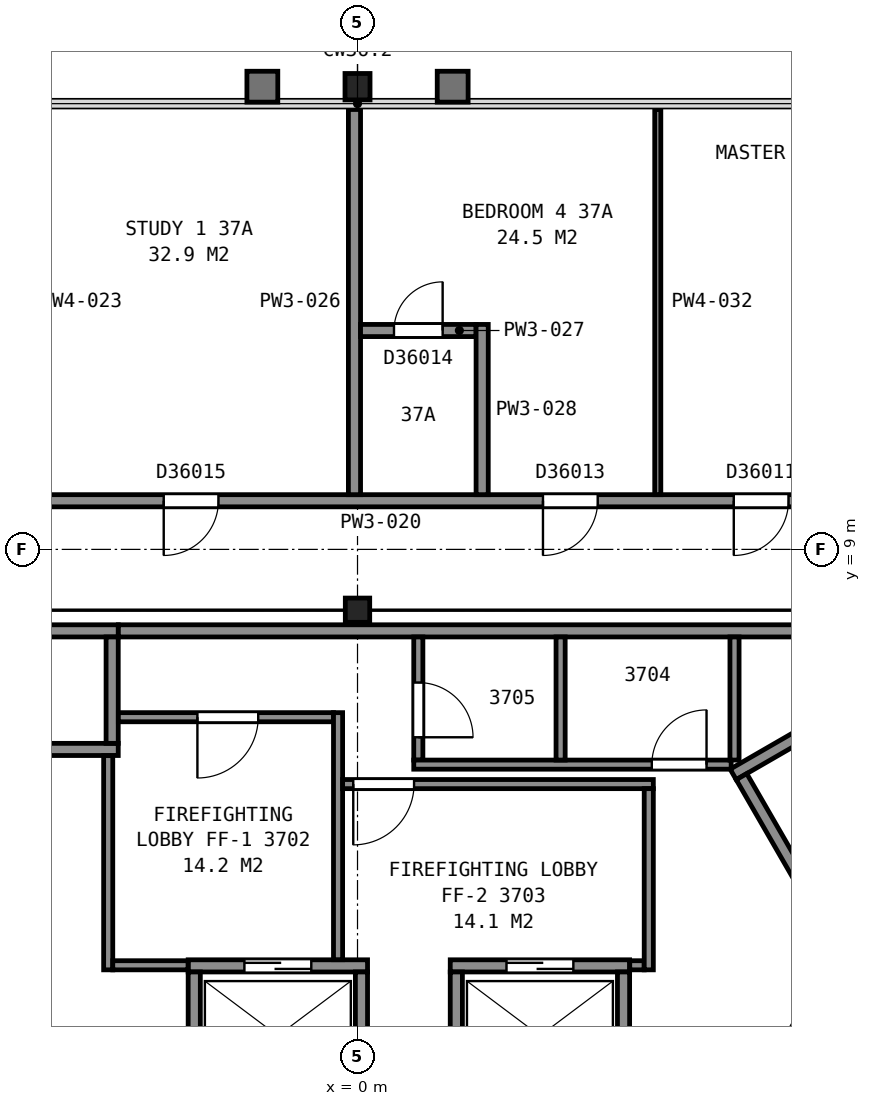
"""IFC4 building model, lengths in metres.
Left out: names, types, materials, properties, quantities, classifications, styles, units other than length and angle.
Written with IfcOpenShell. Run it as: python <this file> out.ifc"""

import sys

from ifc_helpers import new_model, si_unit, direction, frame, frame_2d, origin, origin_2d, place, context, subcontext, project, spatial, rectangle, i_section, extrude, element, fill, save


model = new_model("IFC4")
c1 = context("Model", 3, precision=1e-05, world=origin(), true_north=direction((0.0, 1.0)))
c2 = subcontext(c1, "Body", "Model", "MODEL_VIEW")
j1 = project(units=[si_unit("LENGTHUNIT", "METRE"), si_unit("PLANEANGLEUNIT", "RADIAN")], contexts=[c1])
p1 = place(None, origin())
s1 = spatial("IfcSite", under=j1, at=p1, CompositionType="ELEMENT")
p2 = place(p1, origin())
s2 = spatial("IfcBuilding", under=s1, at=p2, CompositionType="ELEMENT")
p3 = place(p2, frame((0.0, 0.0, 152.5)))
s3 = spatial("IfcBuildingStorey", under=s2, at=p3, CompositionType="ELEMENT", Elevation=152.5)
p4 = place(p3, frame((0.0, 16.61, 0.0), z_axis=(0.0, 0.0, 1.0), x_axis=(1.0, 0.0, 0.0)))
e1 = element("IfcColumn", 1, at=p4, inside=s3, PredefinedType="COLUMN", context=c2, shape_type="SweptSolid", body=[
    extrude(i_section(OverallWidth=0.411, OverallDepth=0.434, WebThickness=0.036, FlangeThickness=0.057, FilletRadius=0.015, at=origin_2d()), origin(), (0.0, 0.0, 1.0), 3.665),
])
p5 = place(p3, frame((0.0, 8.0, 0.0), z_axis=(0.0, 0.0, 1.0), x_axis=(1.0, 0.0, 0.0)))
e2 = element("IfcColumn", 2, at=p5, inside=s3, PredefinedType="COLUMN", context=c2, shape_type="SweptSolid", body=[
    extrude(i_section(OverallWidth=0.401, OverallDepth=0.399, WebThickness=0.025, FlangeThickness=0.04, FilletRadius=0.015, at=origin_2d()), origin(), (0.0, 0.0, 1.0), 3.7),
])
p6 = place(p3, frame((6.178, 5.299, 0.0), z_axis=(0.0, 0.0, 1.0), x_axis=(0.866019993635, 0.500009370536, 0.0)))
e3 = element("IfcWall", 3, at=p6, inside=s3, PredefinedType="PARTITIONING", context=c2, shape_type="SweptSolid", body=[
    extrude(rectangle(XDim=9.6, YDim=0.2, at=frame_2d((4.8, 0.0))), origin(), (0.0, 0.0, 1.0), 3.45),
])
p7 = place(p3, frame((7.715, 2.838, 0.0), z_axis=(0.0, 0.0, 1.0), x_axis=(-0.500049511043, 0.865996816683, 0.0)))
e4 = element("IfcWall", 4, at=p7, inside=s3, PredefinedType="PARTITIONING", context=c2, shape_type="SweptSolid", body=[
    extrude(rectangle(XDim=2.8, YDim=0.2, at=frame_2d((1.4, 0.0))), origin(), (0.0, 0.0, 1.0), 3.45),
])
p8 = place(p3, frame((-2.785, 2.15, 0.0), z_axis=(0.0, 0.0, 1.0), x_axis=(1.0, 0.0, 0.0)))
e5 = element("IfcWall", 5, at=p8, inside=s3, PredefinedType="PARTITIONING", context=c2, shape_type="SweptSolid", body=[
    extrude(rectangle(XDim=2.95, YDim=0.2, at=frame_2d((1.475, 0.0))), origin(), (0.0, 0.0, 1.0), 3.7),
])
p9 = place(p8, frame((0.925, 0.0, 0.0)))
e6 = element("IfcOpeningElement", 6, at=p9, cuts=e5, PredefinedType="OPENING", context=c2, shape_type="SweptSolid", body=[
    extrude(rectangle(XDim=1.1, YDim=2.1, at=frame_2d((0.55, 1.05))), frame((0.0, 0.11, 0.0), z_axis=(0.0, -1.0, 0.0), x_axis=(1.0, 0.0, 0.0)), (0.0, 0.0, 1.0), 0.22),
])
p10 = place(p3, frame((1.525, 2.15, 0.0), z_axis=(0.0, 0.0, 1.0), x_axis=(1.0, 0.0, 0.0)))
e7 = element("IfcWall", 7, at=p10, inside=s3, PredefinedType="PARTITIONING", context=c2, shape_type="SweptSolid", body=[
    extrude(rectangle(XDim=2.95, YDim=0.2, at=frame_2d((1.475, 0.0))), origin(), (0.0, 0.0, 1.0), 3.7),
])
p11 = place(p10, frame((0.925, 0.0, 0.0)))
e8 = element("IfcOpeningElement", 8, at=p11, cuts=e7, PredefinedType="OPENING", context=c2, shape_type="SweptSolid", body=[
    extrude(rectangle(XDim=1.1, YDim=2.1, at=frame_2d((0.55, 1.05))), frame((0.0, 0.11, 0.0), z_axis=(0.0, -1.0, 0.0), x_axis=(1.0, 0.0, 0.0)), (0.0, 0.0, 1.0), 0.22),
])
for number, where, z_axis, x_axis in (
    (9, (-6.285, 5.71, 0.0), (0.0, 0.0, 1.0), (1.0, 0.0, 0.0)),
    (10, (-6.285, 7.66, 0.0), (0.0, 0.0, 1.0), (1.0, 0.0, 0.0)),
):
    element("IfcWall", number, at=place(p3, frame(where, z_axis=z_axis, x_axis=x_axis)), inside=s3, PredefinedType="PARTITIONING", context=c2, shape_type="SweptSolid", body=[
        extrude(rectangle(XDim=2.35, YDim=0.2, at=frame_2d((1.175, 0.0))), origin(), (0.0, 0.0, 1.0), 3.7),
    ])
p12 = place(p3, frame((5.663, -1.612, 0.0), z_axis=(0.0, 0.0, 1.0), x_axis=(0.49998122708, 0.866036242063, 0.0)))
e11 = element("IfcWall", 11, at=p12, inside=s3, PredefinedType="PARTITIONING", context=c2, shape_type="SweptSolid", body=[
    extrude(rectangle(XDim=4.9, YDim=0.2, at=frame_2d((2.45, 0.0))), origin(), (0.0, 0.0, 1.0), 3.7),
])
for number, where, z_axis, x_axis in (
    (12, (4.375, 0.1, 0.0), (0.0, 0.0, 1.0), (0.0, 1.0, 0.0)),
    (13, (1.625, 0.1, 0.0), (0.0, 0.0, 1.0), (0.0, 1.0, 0.0)),
    (14, (0.065, 0.1, 0.0), (0.0, 0.0, 1.0), (0.0, 1.0, 0.0)),
    (15, (-2.685, 0.1, 0.0), (0.0, 0.0, 1.0), (0.0, 1.0, 0.0)),
):
    element("IfcWall", number, at=place(p3, frame(where, z_axis=z_axis, x_axis=x_axis)), inside=s3, PredefinedType="PARTITIONING", context=c2, shape_type="SweptSolid", body=[
        extrude(rectangle(XDim=1.95, YDim=0.2, at=frame_2d((0.975, 0.0))), origin(), (0.0, 0.0, 1.0), 3.7),
    ])
p13 = place(p3, frame((-4.035, 5.81, 0.0), z_axis=(0.0, 0.0, 1.0), x_axis=(0.0, 1.0, 0.0)))
e16 = element("IfcWall", 16, at=p13, inside=s3, PredefinedType="PARTITIONING", context=c2, shape_type="SweptSolid", body=[
    extrude(rectangle(XDim=1.75, YDim=0.2, at=frame_2d((0.875, 0.0))), origin(), (0.0, 0.0, 1.0), 3.7),
])
p14 = place(p3, frame((-4.1, 2.085, 0.0), z_axis=(0.0, 0.0, 1.0), x_axis=(0.0, 1.0, 0.0)))
e17 = element("IfcWall", 17, at=p14, inside=s3, PredefinedType="PARTITIONING", context=c2, shape_type="SweptSolid", body=[
    extrude(rectangle(XDim=3.523, YDim=0.15, at=frame_2d((1.761, 0.0))), origin(), (0.0, 0.0, 1.0), 3.45),
])
p15 = place(p3, frame((-4.025, 2.16, 0.0), z_axis=(0.0, 0.0, 1.0), x_axis=(1.0, 0.0, 0.0)))
e18 = element("IfcWall", 18, at=p15, inside=s3, PredefinedType="PARTITIONING", context=c2, shape_type="SweptSolid", body=[
    extrude(rectangle(XDim=1.238, YDim=0.15, at=frame_2d((0.619, 0.0))), origin(), (0.0, 0.0, 1.0), 3.45),
])
p16 = place(p3, frame((-3.933, 6.24, 0.0), z_axis=(0.0, 0.0, 1.0), x_axis=(1.0, 0.0, 0.0)))
e19 = element("IfcWall", 19, at=p16, inside=s3, PredefinedType="PARTITIONING", context=c2, shape_type="SweptSolid", body=[
    extrude(rectangle(XDim=3.538, YDim=0.15, at=frame_2d((1.769, 0.0))), origin(), (0.0, 0.0, 1.0), 3.45),
])
p17 = place(p16, frame((1.3, 0.0, 0.0)))
e20 = element("IfcOpeningElement", 20, at=p17, cuts=e19, PredefinedType="OPENING", context=c2, shape_type="SweptSolid", body=[
    extrude(rectangle(XDim=1.0, YDim=2.1, at=frame_2d((0.5, 1.05))), frame((0.0, 0.085, 0.0), z_axis=(0.0, -1.0, 0.0), x_axis=(1.0, 0.0, 0.0)), (0.0, 0.0, 1.0), 0.17),
])
p18 = place(p3, frame((-3.933, 7.66, 0.0), z_axis=(0.0, 0.0, 1.0), x_axis=(1.0, 0.0, 0.0)))
e21 = element("IfcWall", 21, at=p18, inside=s3, PredefinedType="PARTITIONING", context=c2, shape_type="SweptSolid", body=[
    extrude(rectangle(XDim=13.841, YDim=0.2, at=frame_2d((6.92, 0.0))), origin(), (0.0, 0.0, 1.0), 3.45),
])
p19 = place(p3, frame((-0.32, 2.252, 0.0), z_axis=(0.0, 0.0, 1.0), x_axis=(0.0, 1.0, 0.0)))
e22 = element("IfcWall", 22, at=p19, inside=s3, PredefinedType="PARTITIONING", context=c2, shape_type="SweptSolid", body=[
    extrude(rectangle(XDim=4.063, YDim=0.15, at=frame_2d((2.031, 0.0))), origin(), (0.0, 0.0, 1.0), 3.45),
])
p20 = place(p3, frame((-0.245, 5.14, 0.0), z_axis=(0.0, 0.0, 1.0), x_axis=(1.0, 0.0, 0.0)))
e23 = element("IfcWall", 23, at=p20, inside=s3, PredefinedType="PARTITIONING", context=c2, shape_type="SweptSolid", body=[
    extrude(rectangle(XDim=5.11, YDim=0.15, at=frame_2d((2.555, 0.0))), origin(), (0.0, 0.0, 1.0), 3.45),
])
p21 = place(p20, frame((0.175, 0.0, 0.0)))
e24 = element("IfcOpeningElement", 24, at=p21, cuts=e23, PredefinedType="OPENING", context=c2, shape_type="SweptSolid", body=[
    extrude(rectangle(XDim=1.0, YDim=2.1, at=frame_2d((0.5, 1.05))), frame((0.0, 0.085, 0.0), z_axis=(0.0, -1.0, 0.0), x_axis=(1.0, 0.0, 0.0)), (0.0, 0.0, 1.0), 0.17),
])
p22 = place(p3, frame((1.0, 7.56, 0.0), z_axis=(0.0, 0.0, 1.0), x_axis=(0.0, -1.0, 0.0)))
e25 = element("IfcWall", 25, at=p22, inside=s3, PredefinedType="PARTITIONING", context=c2, shape_type="SweptSolid", body=[
    extrude(rectangle(XDim=2.025, YDim=0.15, at=frame_2d((1.013, 0.0))), origin(), (0.0, 0.0, 1.0), 3.45),
])
p23 = place(p22, frame((0.75, 0.0, 0.0)))
e26 = element("IfcOpeningElement", 26, at=p23, cuts=e25, PredefinedType="OPENING", context=c2, shape_type="SweptSolid", body=[
    extrude(rectangle(XDim=0.9, YDim=2.1, at=frame_2d((0.45, 1.05))), frame((0.0, 0.085, 0.0), z_axis=(0.0, -1.0, 0.0), x_axis=(1.0, 0.0, 0.0)), (0.0, 0.0, 1.0), 0.17),
])
p24 = place(p3, frame((0.925, 5.46, 0.0), z_axis=(0.0, 0.0, 1.0), x_axis=(1.0, 0.0, 0.0)))
e27 = element("IfcWall", 27, at=p24, inside=s3, PredefinedType="PARTITIONING", context=c2, shape_type="SweptSolid", body=[
    extrude(rectangle(XDim=5.22, YDim=0.15, at=frame_2d((2.61, 0.0))), origin(), (0.0, 0.0, 1.0), 3.45),
])
p25 = place(p24, frame((3.915, 0.0, 0.0)))
e28 = element("IfcOpeningElement", 28, at=p25, cuts=e27, PredefinedType="OPENING", context=c2, shape_type="SweptSolid", body=[
    extrude(rectangle(XDim=0.9, YDim=2.1, at=frame_2d((0.45, 1.05))), frame((0.0, 0.085, 0.0), z_axis=(0.0, -1.0, 0.0), x_axis=(1.0, 0.0, 0.0)), (0.0, 0.0, 1.0), 0.17),
])
p26 = place(p3, frame((3.34, 5.535, 0.0), z_axis=(0.0, 0.0, 1.0), x_axis=(0.0, 1.0, 0.0)))
e29 = element("IfcWall", 29, at=p26, inside=s3, PredefinedType="PARTITIONING", context=c2, shape_type="SweptSolid", body=[
    extrude(rectangle(XDim=2.025, YDim=0.15, at=frame_2d((1.013, 0.0))), origin(), (0.0, 0.0, 1.0), 3.45),
])
p27 = place(p3, frame((4.477, 2.16, 0.0), z_axis=(0.0, 0.0, 1.0), x_axis=(1.0, 0.0, 0.0)))
e30 = element("IfcWall", 30, at=p27, inside=s3, PredefinedType="PARTITIONING", context=c2, shape_type="SweptSolid", body=[
    extrude(rectangle(XDim=0.238, YDim=0.15, at=frame_2d((0.119, 0.0))), origin(), (0.0, 0.0, 1.0), 3.45),
])
p28 = place(p3, frame((4.79, 2.085, 0.0), z_axis=(0.0, 0.0, 1.0), x_axis=(0.0, 1.0, 0.0)))
e31 = element("IfcWall", 31, at=p28, inside=s3, PredefinedType="PARTITIONING", context=c2, shape_type="SweptSolid", body=[
    extrude(rectangle(XDim=2.98, YDim=0.15, at=frame_2d((1.49, 0.0))), origin(), (0.0, 0.0, 1.0), 3.45),
])
p29 = place(p3, frame((6.2, 5.535, 0.0), z_axis=(0.0, 0.0, 1.0), x_axis=(0.0, 1.0, 0.0)))
e32 = element("IfcWall", 32, at=p29, inside=s3, PredefinedType="PARTITIONING", context=c2, shape_type="SweptSolid", body=[
    extrude(rectangle(XDim=2.025, YDim=0.15, at=frame_2d((1.013, 0.0))), origin(), (0.0, 0.0, 1.0), 3.45),
])
p30 = place(p3, frame((-4.075, -12.545, 0.0), z_axis=(0.0, 0.0, 1.0), x_axis=(-0.499999743747, 0.866025551732, 0.0)))
e33 = element("IfcWall", 33, at=p30, inside=s3, PredefinedType="PARTITIONING", context=c2, shape_type="SweptSolid", body=[
    extrude(rectangle(XDim=17.656, YDim=0.2, at=frame_2d((8.828, 0.0))), origin(), (0.0, 0.0, 1.0), 2.713),
])
p31 = place(p30, frame((10.08, 0.0, 0.0)))
e34 = element("IfcOpeningElement", 34, at=p31, cuts=e33, PredefinedType="OPENING", context=c2, shape_type="SweptSolid", body=[
    extrude(rectangle(XDim=0.9, YDim=2.1, at=frame_2d((0.45, 1.05))), frame((0.0, 0.11, 0.0), z_axis=(0.0, -1.0, 0.0), x_axis=(1.0, 0.0, 0.0)), (0.0, 0.0, 1.0), 0.22),
])
p32 = place(p30, frame((6.068, 0.0, 0.0)))
e35 = element("IfcOpeningElement", 35, at=p32, cuts=e33, PredefinedType="OPENING", context=c2, shape_type="SweptSolid", body=[
    extrude(rectangle(XDim=0.9, YDim=2.1, at=frame_2d((0.45, 1.05))), frame((0.0, 0.11, 0.0), z_axis=(0.0, -1.0, 0.0), x_axis=(1.0, 0.0, 0.0)), (0.0, 0.0, 1.0), 0.22),
])
p33 = place(p3, frame((-8.878, 9.8, 0.0), z_axis=(0.0, 0.0, 1.0), x_axis=(1.0, 0.0, 0.0)))
e36 = element("IfcWall", 36, at=p33, inside=s3, PredefinedType="PARTITIONING", context=c2, shape_type="SweptSolid", body=[
    extrude(rectangle(XDim=17.756, YDim=0.2, at=frame_2d((8.878, 0.0))), origin(), (0.0, 0.0, 1.0), 2.713),
])
p34 = place(p33, frame((15.066, 0.0, 0.0)))
e37 = element("IfcOpeningElement", 37, at=p34, cuts=e36, PredefinedType="OPENING", context=c2, shape_type="SweptSolid", body=[
    extrude(rectangle(XDim=0.9, YDim=2.1, at=frame_2d((0.45, 1.05))), frame((0.0, 0.11, 0.0), z_axis=(0.0, -1.0, 0.0), x_axis=(1.0, 0.0, 0.0)), (0.0, 0.0, 1.0), 0.22),
])
p35 = place(p33, frame((11.928, 0.0, 0.0)))
e38 = element("IfcOpeningElement", 38, at=p35, cuts=e36, PredefinedType="OPENING", context=c2, shape_type="SweptSolid", body=[
    extrude(rectangle(XDim=0.9, YDim=2.1, at=frame_2d((0.45, 1.05))), frame((0.0, 0.11, 0.0), z_axis=(0.0, -1.0, 0.0), x_axis=(1.0, 0.0, 0.0)), (0.0, 0.0, 1.0), 0.22),
])
p36 = place(p33, frame((5.691, 0.0, 0.0)))
e39 = element("IfcOpeningElement", 39, at=p36, cuts=e36, PredefinedType="OPENING", context=c2, shape_type="SweptSolid", body=[
    extrude(rectangle(XDim=0.9, YDim=2.1, at=frame_2d((0.45, 1.05))), frame((0.0, 0.11, 0.0), z_axis=(0.0, -1.0, 0.0), x_axis=(1.0, 0.0, 0.0)), (0.0, 0.0, 1.0), 0.22),
])
p37 = place(p33, frame((1.553, 0.0, 0.0)))
e40 = element("IfcOpeningElement", 40, at=p37, cuts=e36, PredefinedType="OPENING", context=c2, shape_type="SweptSolid", body=[
    extrude(rectangle(XDim=0.9, YDim=2.1, at=frame_2d((0.45, 1.05))), frame((0.0, 0.11, 0.0), z_axis=(0.0, -1.0, 0.0), x_axis=(1.0, 0.0, 0.0)), (0.0, 0.0, 1.0), 0.22),
])
p38 = place(p3, frame((-0.05, 9.9, 0.0), z_axis=(0.0, 0.0, 1.0), x_axis=(0.0, 1.0, 0.0)))
e41 = element("IfcWall", 41, at=p38, inside=s3, PredefinedType="PARTITIONING", context=c2, shape_type="SweptSolid", body=[
    extrude(rectangle(XDim=6.335, YDim=0.2, at=frame_2d((3.167, 0.0))), origin(), (0.0, 0.0, 1.0), 2.713),
])
p39 = place(p3, frame((1.95, 12.6, 0.0), z_axis=(0.0, 0.0, 1.0), x_axis=(-1.0, 0.0, 0.0)))
e42 = element("IfcWall", 42, at=p39, inside=s3, PredefinedType="PARTITIONING", context=c2, shape_type="SweptSolid", body=[
    extrude(rectangle(XDim=1.9, YDim=0.2, at=frame_2d((0.95, 0.0))), origin(), (0.0, 0.0, 1.0), 2.713),
])
p40 = place(p39, frame((0.55, 0.0, 0.0)))
e43 = element("IfcOpeningElement", 43, at=p40, cuts=e42, PredefinedType="OPENING", context=c2, shape_type="SweptSolid", body=[
    extrude(rectangle(XDim=0.8, YDim=2.1, at=frame_2d((0.4, 1.05))), frame((0.0, 0.11, 0.0), z_axis=(0.0, -1.0, 0.0), x_axis=(1.0, 0.0, 0.0)), (0.0, 0.0, 1.0), 0.22),
])
p41 = place(p3, frame((2.05, 9.9, 0.0), z_axis=(0.0, 0.0, 1.0), x_axis=(0.0, 1.0, 0.0)))
e44 = element("IfcWall", 44, at=p41, inside=s3, PredefinedType="PARTITIONING", context=c2, shape_type="SweptSolid", body=[
    extrude(rectangle(XDim=2.8, YDim=0.2, at=frame_2d((1.4, 0.0))), origin(), (0.0, 0.0, 1.0), 2.713),
])
p42 = place(p3, frame((12.928, 2.789, 0.0), z_axis=(0.0, 0.0, 1.0), x_axis=(-0.499997769292, -0.86602669168, 0.0)))
e45 = element("IfcWall", 45, at=p42, inside=s3, PredefinedType="PARTITIONING", context=c2, shape_type="SweptSolid", body=[
    extrude(rectangle(XDim=17.706, YDim=0.2, at=frame_2d((8.853, 0.0))), origin(), (0.0, 0.0, 1.0), 2.713),
])
p43 = place(p42, frame((15.156, 0.0, 0.0)))
e46 = element("IfcOpeningElement", 46, at=p43, cuts=e45, PredefinedType="OPENING", context=c2, shape_type="SweptSolid", body=[
    extrude(rectangle(XDim=1.2, YDim=2.1, at=frame_2d((0.6, 1.05))), frame((0.0, 0.11, 0.0), z_axis=(0.0, -1.0, 0.0), x_axis=(1.0, 0.0, 0.0)), (0.0, 0.0, 1.0), 0.22),
])
p44 = place(p42, frame((11.042, 0.0, 0.0)))
e47 = element("IfcOpeningElement", 47, at=p44, cuts=e45, PredefinedType="OPENING", context=c2, shape_type="SweptSolid", body=[
    extrude(rectangle(XDim=0.9, YDim=2.1, at=frame_2d((0.45, 1.05))), frame((0.0, 0.11, 0.0), z_axis=(0.0, -1.0, 0.0), x_axis=(1.0, 0.0, 0.0)), (0.0, 0.0, 1.0), 0.22),
])
p45 = place(p42, frame((7.14, 0.0, 0.0)))
e48 = element("IfcOpeningElement", 48, at=p45, cuts=e45, PredefinedType="OPENING", context=c2, shape_type="SweptSolid", body=[
    extrude(rectangle(XDim=0.9, YDim=2.1, at=frame_2d((0.45, 1.05))), frame((0.0, 0.11, 0.0), z_axis=(0.0, -1.0, 0.0), x_axis=(1.0, 0.0, 0.0)), (0.0, 0.0, 1.0), 0.22),
])
p46 = place(p42, frame((0.515, 0.0, 0.0)))
e49 = element("IfcOpeningElement", 49, at=p46, cuts=e45, PredefinedType="OPENING", context=c2, shape_type="SweptSolid", body=[
    extrude(rectangle(XDim=0.9, YDim=2.1, at=frame_2d((0.45, 1.05))), frame((0.0, 0.11, 0.0), z_axis=(0.0, -1.0, 0.0), x_axis=(1.0, 0.0, 0.0)), (0.0, 0.0, 1.0), 0.22),
])
p47 = place(p3, frame((4.938, 9.9, 0.0), z_axis=(0.0, 0.0, 1.0), x_axis=(0.0, 1.0, 0.0)))
e50 = element("IfcWall", 50, at=p47, inside=s3, PredefinedType="PARTITIONING", context=c2, shape_type="SweptSolid", body=[
    extrude(rectangle(XDim=6.335, YDim=0.1, at=frame_2d((3.167, 0.0))), origin(), (0.0, 0.0, 1.0), 2.713),
])
p48 = place(p9, origin())
e51 = element("IfcDoor", 51, at=p48, inside=s3, OperationType="SLIDING_TO_LEFT", PredefinedType="DOOR", context=c2, shape_type="SweptSolid", body=[
    extrude(rectangle(XDim=1.1, YDim=2.1, at=frame_2d((0.55, 1.05))), frame((0.0, 0.025, 0.0), z_axis=(0.0, -1.0, 0.0), x_axis=(1.0, 0.0, 0.0)), (0.0, 0.0, 1.0), 0.05),
])
fill(e6, e51)
p49 = place(p11, origin())
e52 = element("IfcDoor", 52, at=p49, inside=s3, OperationType="SLIDING_TO_RIGHT", PredefinedType="DOOR", context=c2, shape_type="SweptSolid", body=[
    extrude(rectangle(XDim=1.1, YDim=2.1, at=frame_2d((0.55, 1.05))), frame((0.0, 0.025, 0.0), z_axis=(0.0, -1.0, 0.0), x_axis=(1.0, 0.0, 0.0)), (0.0, 0.0, 1.0), 0.05),
])
fill(e8, e52)
p50 = place(p17, origin())
e53 = element("IfcDoor", 53, at=p50, inside=s3, OperationType="SINGLE_SWING_LEFT", PredefinedType="DOOR", context=c2, shape_type="SweptSolid", body=[
    extrude(rectangle(XDim=1.0, YDim=2.1, at=frame_2d((0.5, 1.05))), frame((0.0, 0.025, 0.0), z_axis=(0.0, -1.0, 0.0), x_axis=(1.0, 0.0, 0.0)), (0.0, 0.0, 1.0), 0.05),
])
fill(e20, e53)
p51 = place(p21, origin())
e54 = element("IfcDoor", 54, at=p51, inside=s3, OperationType="SINGLE_SWING_LEFT", PredefinedType="DOOR", context=c2, shape_type="SweptSolid", body=[
    extrude(rectangle(XDim=1.0, YDim=2.1, at=frame_2d((0.5, 1.05))), frame((0.0, 0.025, 0.0), z_axis=(0.0, -1.0, 0.0), x_axis=(1.0, 0.0, 0.0)), (0.0, 0.0, 1.0), 0.05),
])
fill(e24, e54)
p52 = place(p23, origin())
e55 = element("IfcDoor", 55, at=p52, inside=s3, OperationType="SINGLE_SWING_RIGHT", PredefinedType="DOOR", context=c2, shape_type="SweptSolid", body=[
    extrude(rectangle(XDim=0.9, YDim=2.1, at=frame_2d((0.45, 1.05))), frame((0.0, 0.025, 0.0), z_axis=(0.0, -1.0, 0.0), x_axis=(1.0, 0.0, 0.0)), (0.0, 0.0, 1.0), 0.05),
])
fill(e26, e55)
p53 = place(p25, origin())
e56 = element("IfcDoor", 56, at=p53, inside=s3, OperationType="SINGLE_SWING_RIGHT", PredefinedType="DOOR", context=c2, shape_type="SweptSolid", body=[
    extrude(rectangle(XDim=0.9, YDim=2.1, at=frame_2d((0.45, 1.05))), frame((0.0, 0.025, 0.0), z_axis=(0.0, -1.0, 0.0), x_axis=(1.0, 0.0, 0.0)), (0.0, 0.0, 1.0), 0.05),
])
fill(e28, e56)
p54 = place(p34, origin())
e57 = element("IfcDoor", 57, at=p54, inside=s3, OperationType="SINGLE_SWING_LEFT", PredefinedType="DOOR", context=c2, shape_type="SweptSolid", body=[
    extrude(rectangle(XDim=0.9, YDim=2.1, at=frame_2d((0.45, 1.05))), frame((0.0, 0.025, 0.0), z_axis=(0.0, -1.0, 0.0), x_axis=(1.0, 0.0, 0.0)), (0.0, 0.0, 1.0), 0.05),
])
fill(e37, e57)
p55 = place(p35, origin())
e58 = element("IfcDoor", 58, at=p55, inside=s3, OperationType="SINGLE_SWING_LEFT", PredefinedType="DOOR", context=c2, shape_type="SweptSolid", body=[
    extrude(rectangle(XDim=0.9, YDim=2.1, at=frame_2d((0.45, 1.05))), frame((0.0, 0.025, 0.0), z_axis=(0.0, -1.0, 0.0), x_axis=(1.0, 0.0, 0.0)), (0.0, 0.0, 1.0), 0.05),
])
fill(e38, e58)
p56 = place(p36, origin())
e59 = element("IfcDoor", 59, at=p56, inside=s3, OperationType="SINGLE_SWING_LEFT", PredefinedType="DOOR", context=c2, shape_type="SweptSolid", body=[
    extrude(rectangle(XDim=0.9, YDim=2.1, at=frame_2d((0.45, 1.05))), frame((0.0, 0.025, 0.0), z_axis=(0.0, -1.0, 0.0), x_axis=(1.0, 0.0, 0.0)), (0.0, 0.0, 1.0), 0.05),
])
fill(e39, e59)
p57 = place(p40, origin())
e60 = element("IfcDoor", 60, at=p57, inside=s3, OperationType="SINGLE_SWING_LEFT", PredefinedType="DOOR", context=c2, shape_type="SweptSolid", body=[
    extrude(rectangle(XDim=0.8, YDim=2.1, at=frame_2d((0.4, 1.05))), frame((0.0, 0.025, 0.0), z_axis=(0.0, -1.0, 0.0), x_axis=(1.0, 0.0, 0.0)), (0.0, 0.0, 1.0), 0.05),
])
fill(e43, e60)
save(model, sys.argv[1])
